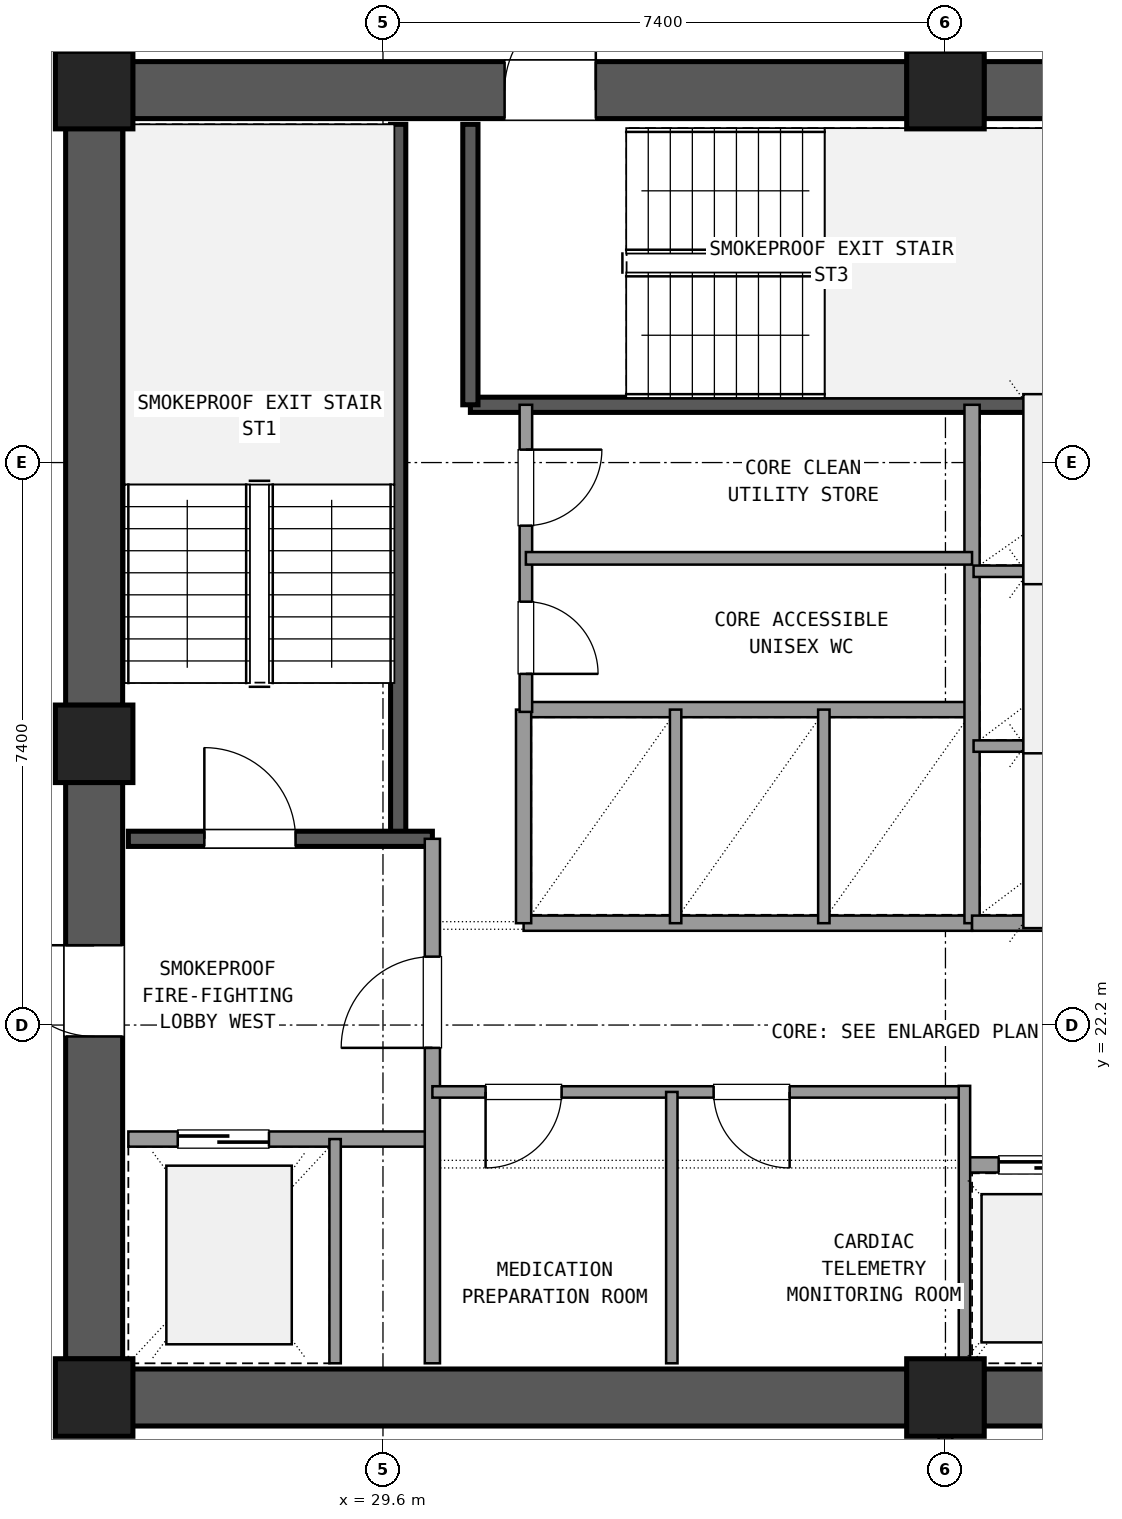
"""IFC4 building model, lengths in metres.
Left out: names, types, materials, properties, quantities, classifications, styles, units other than length and angle.
Written with IfcOpenShell. Run it as: python <this file> out.ifc"""

import sys

from ifc_helpers import new_model, si_unit, direction, frame, frame_2d, origin, origin_2d, place, context, subcontext, project, spatial, rectangle, extrude, element, fill, save


model = new_model("IFC4")
c1 = context("Model", 3, precision=1e-05, world=origin(), true_north=direction((0.0, 1.0)))
c2 = subcontext(c1, "Body", "Model", "MODEL_VIEW")
j1 = project(units=[si_unit("LENGTHUNIT", "METRE"), si_unit("PLANEANGLEUNIT", "RADIAN")], contexts=[c1])
p1 = place(None, origin())
s1 = spatial("IfcSite", under=j1, at=p1, CompositionType="ELEMENT")
p2 = place(p1, origin())
s2 = spatial("IfcBuilding", under=s1, at=p2, CompositionType="ELEMENT")
p3 = place(p2, frame((0.0, 0.0, 163.62)))
s3 = spatial("IfcBuildingStorey", under=s2, at=p3, CompositionType="ELEMENT", Elevation=163.62)
for number, where, z_axis, x_axis in (
    (1, (25.8, 17.3, 0.0), (0.0, 0.0, 1.0), (1.0, 0.0, 0.0)),
    (2, (37.0, 17.3, 0.0), (0.0, 0.0, 1.0), (1.0, 0.0, 0.0)),
    (3, (37.0, 34.5, 0.0), (0.0, 0.0, 1.0), (1.0, 0.0, 0.0)),
    (4, (25.8, 34.5, 0.0), (0.0, 0.0, 1.0), (1.0, 0.0, 0.0)),
    (5, (25.8, 25.9, 0.0), (0.0, 0.0, 1.0), (1.0, 0.0, 0.0)),
):
    element("IfcColumn", number, at=place(p3, frame(where, z_axis=z_axis, x_axis=x_axis)), inside=s3, PredefinedType="COLUMN", context=c2, shape_type="SweptSolid", body=[
        extrude(rectangle(XDim=1.02, YDim=1.02, at=origin_2d()), origin(), (0.0, 0.0, 1.0), 3.6),
    ])
for number, where, z_axis, x_axis in (
    (6, (26.305, 17.3, 0.0), (0.0, 0.0, 1.0), (1.0, 0.0, 0.0)),
    (7, (37.505, 17.3, 0.0), (0.0, 0.0, 1.0), (1.0, 0.0, 0.0)),
):
    element("IfcWall", number, at=place(p3, frame(where, z_axis=z_axis, x_axis=x_axis)), inside=s3, PredefinedType="SHEAR", context=c2, shape_type="SweptSolid", body=[
        extrude(rectangle(XDim=10.19, YDim=0.75, at=frame_2d((5.095, 0.0))), origin(), (0.0, 0.0, 1.0), 3.32),
    ])
p4 = place(p3, frame((47.695, 34.5, 0.0), z_axis=(0.0, 0.0, 1.0), x_axis=(-1.0, 0.0, 0.0)))
e8 = element("IfcWall", 8, at=p4, inside=s3, PredefinedType="SHEAR", context=c2, shape_type="SweptSolid", body=[
    extrude(rectangle(XDim=10.19, YDim=0.75, at=frame_2d((5.095, 0.0))), origin(), (0.0, 0.0, 1.0), 3.32),
])
p5 = place(p4, frame((4.595, 0.0, 0.0)))
e9 = element("IfcOpeningElement", 9, at=p5, cuts=e8, PredefinedType="OPENING", context=c2, shape_type="SweptSolid", body=[
    extrude(rectangle(XDim=1.6, YDim=2.2, at=frame_2d((0.8, 1.1))), frame((0.0, 0.385, 0.0), z_axis=(0.0, -1.0, 0.0), x_axis=(1.0, 0.0, 0.0)), (0.0, 0.0, 1.0), 0.77),
])
p6 = place(p3, frame((36.495, 34.5, 0.0), z_axis=(0.0, 0.0, 1.0), x_axis=(-1.0, 0.0, 0.0)))
e10 = element("IfcWall", 10, at=p6, inside=s3, PredefinedType="SHEAR", context=c2, shape_type="SweptSolid", body=[
    extrude(rectangle(XDim=10.19, YDim=0.75, at=frame_2d((5.095, 0.0))), origin(), (0.0, 0.0, 1.0), 3.32),
])
p7 = place(p6, frame((4.095, 0.0, 0.0)))
e11 = element("IfcOpeningElement", 11, at=p7, cuts=e10, PredefinedType="OPENING", context=c2, shape_type="SweptSolid", body=[
    extrude(rectangle(XDim=1.2, YDim=2.15, at=frame_2d((0.6, 1.075))), frame((0.0, 0.385, 0.0), z_axis=(0.0, -1.0, 0.0), x_axis=(1.0, 0.0, 0.0)), (0.0, 0.0, 1.0), 0.77),
])
p8 = place(p3, frame((25.8, 33.995, 0.0), z_axis=(0.0, 0.0, 1.0), x_axis=(0.0, -1.0, 0.0)))
e12 = element("IfcWall", 12, at=p8, inside=s3, PredefinedType="SHEAR", context=c2, shape_type="SweptSolid", body=[
    extrude(rectangle(XDim=7.59, YDim=0.75, at=frame_2d((3.795, 0.0))), origin(), (0.0, 0.0, 1.0), 3.32),
])
p9 = place(p3, frame((25.8, 25.395, 0.0), z_axis=(0.0, 0.0, 1.0), x_axis=(0.0, -1.0, 0.0)))
e13 = element("IfcWall", 13, at=p9, inside=s3, PredefinedType="SHEAR", context=c2, shape_type="SweptSolid", body=[
    extrude(rectangle(XDim=7.59, YDim=0.75, at=frame_2d((3.795, 0.0))), origin(), (0.0, 0.0, 1.0), 3.32),
])
p10 = place(p9, frame((2.145, 0.0, 0.0)))
e14 = element("IfcOpeningElement", 14, at=p10, cuts=e13, PredefinedType="OPENING", context=c2, shape_type="SweptSolid", body=[
    extrude(rectangle(XDim=1.2, YDim=2.15, at=frame_2d((0.6, 1.075))), frame((0.0, 0.385, 0.0), z_axis=(0.0, -1.0, 0.0), x_axis=(1.0, 0.0, 0.0)), (0.0, 0.0, 1.0), 0.77),
])
p11 = place(p3, frame((29.8, 24.65, 0.0), z_axis=(0.0, 0.0, 1.0), x_axis=(0.0, 1.0, 0.0)))
e15 = element("IfcWall", 15, at=p11, inside=s3, PredefinedType="SHEAR", context=c2, shape_type="SweptSolid", body=[
    extrude(rectangle(XDim=9.4, YDim=0.2, at=frame_2d((4.7, 0.0))), origin(), (0.0, 0.0, 1.0), 3.32),
])
p12 = place(p3, frame((26.25, 24.65, 0.0), z_axis=(0.0, 0.0, 1.0), x_axis=(1.0, 0.0, 0.0)))
e16 = element("IfcWall", 16, at=p12, inside=s3, PredefinedType="SHEAR", context=c2, shape_type="SweptSolid", body=[
    extrude(rectangle(XDim=4.0, YDim=0.2, at=frame_2d((2.0, 0.0))), origin(), (0.0, 0.0, 1.0), 3.32),
])
p13 = place(p12, frame((1.0, 0.0, 0.0)))
e17 = element("IfcOpeningElement", 17, at=p13, cuts=e16, PredefinedType="OPENING", context=c2, shape_type="SweptSolid", body=[
    extrude(rectangle(XDim=1.2, YDim=2.15, at=frame_2d((0.6, 1.075))), frame((0.0, 0.11, 0.0), z_axis=(0.0, -1.0, 0.0), x_axis=(1.0, 0.0, 0.0)), (0.0, 0.0, 1.0), 0.22),
])
p14 = place(p3, frame((30.75, 30.36, 0.0), z_axis=(0.0, 0.0, 1.0), x_axis=(1.0, 0.0, 0.0)))
e18 = element("IfcWall", 18, at=p14, inside=s3, PredefinedType="SHEAR", context=c2, shape_type="SweptSolid", body=[
    extrude(rectangle(XDim=9.5, YDim=0.2, at=frame_2d((4.75, 0.0))), origin(), (0.0, 0.0, 1.0), 3.32),
])
p15 = place(p3, frame((30.75, 30.36, 0.0), z_axis=(0.0, 0.0, 1.0), x_axis=(0.0, 1.0, 0.0)))
e19 = element("IfcWall", 19, at=p15, inside=s3, PredefinedType="SHEAR", context=c2, shape_type="SweptSolid", body=[
    extrude(rectangle(XDim=3.69, YDim=0.2, at=frame_2d((1.845, 0.0))), origin(), (0.0, 0.0, 1.0), 3.32),
])
p16 = place(p3, frame((26.25, 20.7, 0.0), z_axis=(0.0, 0.0, 1.0), x_axis=(1.0, 0.0, 0.0)))
e20 = element("IfcWall", 20, at=p16, inside=s3, PredefinedType="SOLIDWALL", context=c2, shape_type="SweptSolid", body=[
    extrude(rectangle(XDim=4.0, YDim=0.2, at=frame_2d((2.0, 0.0))), origin(), (0.0, 0.0, 1.0), 2.61),
])
p17 = place(p16, frame((0.65, 0.0, 0.0)))
e21 = element("IfcOpeningElement", 21, at=p17, cuts=e20, PredefinedType="OPENING", context=c2, shape_type="SweptSolid", body=[
    extrude(rectangle(XDim=1.2, YDim=2.15, at=frame_2d((0.6, 1.075))), frame((0.0, 0.11, 0.0), z_axis=(0.0, -1.0, 0.0), x_axis=(1.0, 0.0, 0.0)), (0.0, 0.0, 1.0), 0.22),
])
p18 = place(p3, frame((30.25, 17.75, 0.0), z_axis=(0.0, 0.0, 1.0), x_axis=(0.0, 1.0, 0.0)))
e22 = element("IfcWall", 22, at=p18, inside=s3, PredefinedType="SOLIDWALL", context=c2, shape_type="SweptSolid", body=[
    extrude(rectangle(XDim=6.9, YDim=0.2, at=frame_2d((3.45, 0.0))), origin(), (0.0, 0.0, 1.0), 2.61),
])
p19 = place(p18, frame((4.15, 0.0, 0.0)))
e23 = element("IfcOpeningElement", 23, at=p19, cuts=e22, PredefinedType="OPENING", context=c2, shape_type="SweptSolid", body=[
    extrude(rectangle(XDim=1.2, YDim=2.15, at=frame_2d((0.6, 1.075))), frame((0.0, 0.11, 0.0), z_axis=(0.0, -1.0, 0.0), x_axis=(1.0, 0.0, 0.0)), (0.0, 0.0, 1.0), 0.22),
])
p20 = place(p3, frame((28.97, 17.75, 0.0), z_axis=(0.0, 0.0, 1.0), x_axis=(0.0, 1.0, 0.0)))
e24 = element("IfcWall", 24, at=p20, inside=s3, PredefinedType="PARTITIONING", context=c2, shape_type="SweptSolid", body=[
    extrude(rectangle(XDim=2.95, YDim=0.15, at=frame_2d((1.475, 0.0))), origin(), (0.0, 0.0, 1.0), 2.61),
])
p21 = place(p3, frame((30.25, 21.32, 0.0), z_axis=(0.0, 0.0, 1.0), x_axis=(1.0, 0.0, 0.0)))
e25 = element("IfcWall", 25, at=p21, inside=s3, PredefinedType="PARTITIONING", context=c2, shape_type="SweptSolid", body=[
    extrude(rectangle(XDim=7.0, YDim=0.15, at=frame_2d((3.5, 0.0))), origin(), (0.0, 0.0, 1.0), 2.61),
])
p22 = place(p21, frame((0.7, 0.0, 0.0)))
e26 = element("IfcOpeningElement", 26, at=p22, cuts=e25, PredefinedType="OPENING", context=c2, shape_type="SweptSolid", body=[
    extrude(rectangle(XDim=1.0, YDim=2.15, at=frame_2d((0.5, 1.075))), frame((0.0, 0.085, 0.0), z_axis=(0.0, -1.0, 0.0), x_axis=(1.0, 0.0, 0.0)), (0.0, 0.0, 1.0), 0.17),
])
p23 = place(p21, frame((3.7, 0.0, 0.0)))
e27 = element("IfcOpeningElement", 27, at=p23, cuts=e25, PredefinedType="OPENING", context=c2, shape_type="SweptSolid", body=[
    extrude(rectangle(XDim=1.0, YDim=2.15, at=frame_2d((0.5, 1.075))), frame((0.0, 0.085, 0.0), z_axis=(0.0, -1.0, 0.0), x_axis=(1.0, 0.0, 0.0)), (0.0, 0.0, 1.0), 0.17),
])
p24 = place(p3, frame((33.4, 17.75, 0.0), z_axis=(0.0, 0.0, 1.0), x_axis=(0.0, 1.0, 0.0)))
e28 = element("IfcWall", 28, at=p24, inside=s3, PredefinedType="PARTITIONING", context=c2, shape_type="SweptSolid", body=[
    extrude(rectangle(XDim=3.57, YDim=0.15, at=frame_2d((1.785, 0.0))), origin(), (0.0, 0.0, 1.0), 2.61),
])
p25 = place(p3, frame((37.25, 20.36, 0.0), z_axis=(0.0, 0.0, 1.0), x_axis=(1.0, 0.0, 0.0)))
e29 = element("IfcWall", 29, at=p25, inside=s3, PredefinedType="SOLIDWALL", context=c2, shape_type="SweptSolid", body=[
    extrude(rectangle(XDim=6.1, YDim=0.2, at=frame_2d((3.05, 0.0))), origin(), (0.0, 0.0, 1.0), 2.61),
])
p26 = place(p25, frame((0.45, 0.0, 0.0)))
e30 = element("IfcOpeningElement", 30, at=p26, cuts=e29, PredefinedType="OPENING", context=c2, shape_type="SweptSolid", body=[
    extrude(rectangle(XDim=1.1, YDim=2.15, at=frame_2d((0.55, 1.075))), frame((0.0, 0.11, 0.0), z_axis=(0.0, -1.0, 0.0), x_axis=(1.0, 0.0, 0.0)), (0.0, 0.0, 1.0), 0.22),
])
p27 = place(p25, frame((2.5, 0.0, 0.0)))
e31 = element("IfcOpeningElement", 31, at=p27, cuts=e29, PredefinedType="OPENING", context=c2, shape_type="SweptSolid", body=[
    extrude(rectangle(XDim=1.1, YDim=2.15, at=frame_2d((0.55, 1.075))), frame((0.0, 0.11, 0.0), z_axis=(0.0, -1.0, 0.0), x_axis=(1.0, 0.0, 0.0)), (0.0, 0.0, 1.0), 0.22),
])
p28 = place(p25, frame((4.55, 0.0, 0.0)))
e32 = element("IfcOpeningElement", 32, at=p28, cuts=e29, PredefinedType="OPENING", context=c2, shape_type="SweptSolid", body=[
    extrude(rectangle(XDim=1.1, YDim=2.15, at=frame_2d((0.55, 1.075))), frame((0.0, 0.11, 0.0), z_axis=(0.0, -1.0, 0.0), x_axis=(1.0, 0.0, 0.0)), (0.0, 0.0, 1.0), 0.22),
])
p29 = place(p3, frame((37.25, 17.75, 0.0), z_axis=(0.0, 0.0, 1.0), x_axis=(0.0, 1.0, 0.0)))
e33 = element("IfcWall", 33, at=p29, inside=s3, PredefinedType="PARTITIONING", context=c2, shape_type="SweptSolid", body=[
    extrude(rectangle(XDim=3.65, YDim=0.15, at=frame_2d((1.825, 0.0))), origin(), (0.0, 0.0, 1.0), 2.61),
])
for number, where, z_axis, x_axis in (
    (34, (31.45, 23.54, 0.0), (0.0, 0.0, 1.0), (1.0, 0.0, 0.0)),
    (35, (31.45, 26.35, 0.0), (0.0, 0.0, 1.0), (1.0, 0.0, 0.0)),
):
    element("IfcWall", number, at=place(p3, frame(where, z_axis=z_axis, x_axis=x_axis)), inside=s3, PredefinedType="SOLIDWALL", context=c2, shape_type="SweptSolid", body=[
        extrude(rectangle(XDim=5.9, YDim=0.2, at=frame_2d((2.95, 0.0))), origin(), (0.0, 0.0, 1.0), 2.61),
    ])
p30 = place(p3, frame((31.45, 23.54, 0.0), z_axis=(0.0, 0.0, 1.0), x_axis=(0.0, 1.0, 0.0)))
e36 = element("IfcWall", 36, at=p30, inside=s3, PredefinedType="SOLIDWALL", context=c2, shape_type="SweptSolid", body=[
    extrude(rectangle(XDim=2.81, YDim=0.2, at=frame_2d((1.405, 0.0))), origin(), (0.0, 0.0, 1.0), 2.61),
])
for number, where, z_axis, x_axis in (
    (37, (33.45, 23.54, 0.0), (0.0, 0.0, 1.0), (0.0, 1.0, 0.0)),
    (38, (35.4, 23.54, 0.0), (0.0, 0.0, 1.0), (0.0, 1.0, 0.0)),
):
    element("IfcWall", number, at=place(p3, frame(where, z_axis=z_axis, x_axis=x_axis)), inside=s3, PredefinedType="PARTITIONING", context=c2, shape_type="SweptSolid", body=[
        extrude(rectangle(XDim=2.81, YDim=0.15, at=frame_2d((1.405, 0.0))), origin(), (0.0, 0.0, 1.0), 2.61),
    ])
p31 = place(p3, frame((37.35, 23.54, 0.0), z_axis=(0.0, 0.0, 1.0), x_axis=(0.0, 1.0, 0.0)))
e39 = element("IfcWall", 39, at=p31, inside=s3, PredefinedType="SOLIDWALL", context=c2, shape_type="SweptSolid", body=[
    extrude(rectangle(XDim=6.82, YDim=0.2, at=frame_2d((3.41, 0.0))), origin(), (0.0, 0.0, 1.0), 2.61),
])
p32 = place(p3, frame((37.35, 23.54, 0.0), z_axis=(0.0, 0.0, 1.0), x_axis=(1.0, 0.0, 0.0)))
e40 = element("IfcWall", 40, at=p32, inside=s3, PredefinedType="SOLIDWALL", context=c2, shape_type="SweptSolid", body=[
    extrude(rectangle(XDim=3.05, YDim=0.2, at=frame_2d((1.525, 0.0))), origin(), (0.0, 0.0, 1.0), 2.61),
])
for number, where, z_axis, x_axis in (
    (41, (37.37, 25.87, 0.0), (0.0, 0.0, 1.0), (1.0, 0.0, 0.0)),
    (42, (37.37, 28.17, 0.0), (0.0, 0.0, 1.0), (1.0, 0.0, 0.0)),
):
    element("IfcWall", number, at=place(p3, frame(where, z_axis=z_axis, x_axis=x_axis)), inside=s3, PredefinedType="PARTITIONING", context=c2, shape_type="SweptSolid", body=[
        extrude(rectangle(XDim=3.01, YDim=0.15, at=frame_2d((1.505, 0.0))), origin(), (0.0, 0.0, 1.0), 2.61),
    ])
p33 = place(p3, frame((31.48, 26.32, 0.0), z_axis=(0.0, 0.0, 1.0), x_axis=(0.0, 1.0, 0.0)))
e43 = element("IfcWall", 43, at=p33, inside=s3, PredefinedType="PLUMBINGWALL", context=c2, shape_type="SweptSolid", body=[
    extrude(rectangle(XDim=4.04, YDim=0.165, at=frame_2d((2.02, 0.0))), origin(), (0.0, 0.0, 1.0), 2.61),
])
p34 = place(p33, frame((0.5, 0.0, 0.0)))
e44 = element("IfcOpeningElement", 44, at=p34, cuts=e43, PredefinedType="OPENING", context=c2, shape_type="SweptSolid", body=[
    extrude(rectangle(XDim=0.95, YDim=2.1, at=frame_2d((0.475, 1.05))), frame((0.0, 0.093, 0.0), z_axis=(0.0, -1.0, 0.0), x_axis=(1.0, 0.0, 0.0)), (0.0, 0.0, 1.0), 0.185),
])
p35 = place(p33, frame((2.45, 0.0, 0.0)))
e45 = element("IfcOpeningElement", 45, at=p35, cuts=e43, PredefinedType="OPENING", context=c2, shape_type="SweptSolid", body=[
    extrude(rectangle(XDim=1.0, YDim=2.15, at=frame_2d((0.5, 1.075))), frame((0.0, 0.093, 0.0), z_axis=(0.0, -1.0, 0.0), x_axis=(1.0, 0.0, 0.0)), (0.0, 0.0, 1.0), 0.185),
])
p36 = place(p3, frame((31.48, 28.34, 0.0), z_axis=(0.0, 0.0, 1.0), x_axis=(1.0, 0.0, 0.0)))
e46 = element("IfcWall", 46, at=p36, inside=s3, PredefinedType="PLUMBINGWALL", context=c2, shape_type="SweptSolid", body=[
    extrude(rectangle(XDim=5.87, YDim=0.165, at=frame_2d((2.935, 0.0))), origin(), (0.0, 0.0, 1.0), 2.61),
])
p37 = place(p3, frame((37.0, 34.95, 0.0), z_axis=(0.0, 0.0, 1.0), x_axis=(0.0, 1.0, 0.0)))
e47 = element("IfcWall", 47, at=p37, inside=s3, PredefinedType="PARTITIONING", context=c2, shape_type="SweptSolid", body=[
    extrude(rectangle(XDim=3.21, YDim=0.18, at=frame_2d((1.605, 0.0))), origin(), (0.0, 0.0, 1.0), 2.61),
])
p38 = place(p37, frame((0.605, 0.0, 0.0)))
e48 = element("IfcOpeningElement", 48, at=p38, cuts=e47, PredefinedType="OPENING", context=c2, shape_type="SweptSolid", body=[
    extrude(rectangle(XDim=2.0, YDim=2.2, at=frame_2d((1.0, 1.1))), frame((0.0, 0.1, 0.0), z_axis=(0.0, -1.0, 0.0), x_axis=(1.0, 0.0, 0.0)), (0.0, 0.0, 1.0), 0.2),
])
p39 = place(p3, frame((37.0, 13.64, 0.0), z_axis=(0.0, 0.0, 1.0), x_axis=(0.0, 1.0, 0.0)))
e49 = element("IfcWall", 49, at=p39, inside=s3, PredefinedType="PARTITIONING", context=c2, shape_type="SweptSolid", body=[
    extrude(rectangle(XDim=3.21, YDim=0.18, at=frame_2d((1.605, 0.0))), origin(), (0.0, 0.0, 1.0), 2.61),
])
p40 = place(p39, frame((0.605, 0.0, 0.0)))
e50 = element("IfcOpeningElement", 50, at=p40, cuts=e49, PredefinedType="OPENING", context=c2, shape_type="SweptSolid", body=[
    extrude(rectangle(XDim=2.0, YDim=2.2, at=frame_2d((1.0, 1.1))), frame((0.0, 0.1, 0.0), z_axis=(0.0, -1.0, 0.0), x_axis=(1.0, 0.0, 0.0)), (0.0, 0.0, 1.0), 0.2),
])
p41 = place(p13, origin())
e51 = element("IfcDoor", 51, at=p41, inside=s3, OperationType="SINGLE_SWING_LEFT", PredefinedType="DOOR", context=c2, shape_type="SweptSolid", body=[
    extrude(rectangle(XDim=1.2, YDim=2.15, at=frame_2d((0.6, 1.075))), frame((0.0, 0.025, 0.0), z_axis=(0.0, -1.0, 0.0), x_axis=(1.0, 0.0, 0.0)), (0.0, 0.0, 1.0), 0.05),
])
fill(e17, e51)
p42 = place(p17, origin())
e52 = element("IfcDoor", 52, at=p42, inside=s3, OperationType="SLIDING_TO_LEFT", PredefinedType="DOOR", context=c2, shape_type="SweptSolid", body=[
    extrude(rectangle(XDim=1.2, YDim=2.15, at=frame_2d((0.6, 1.075))), frame((0.0, 0.025, 0.0), z_axis=(0.0, -1.0, 0.0), x_axis=(1.0, 0.0, 0.0)), (0.0, 0.0, 1.0), 0.05),
])
fill(e21, e52)
p43 = place(p19, origin())
e53 = element("IfcDoor", 53, at=p43, inside=s3, OperationType="SINGLE_SWING_LEFT", PredefinedType="DOOR", context=c2, shape_type="SweptSolid", body=[
    extrude(rectangle(XDim=1.2, YDim=2.15, at=frame_2d((0.6, 1.075))), frame((0.0, 0.025, 0.0), z_axis=(0.0, -1.0, 0.0), x_axis=(1.0, 0.0, 0.0)), (0.0, 0.0, 1.0), 0.05),
])
fill(e23, e53)
p44 = place(p10, frame((1.2, 0.0, 0.0), z_axis=(0.0, 0.0, 1.0), x_axis=(-1.0, 0.0, 0.0)))
e54 = element("IfcDoor", 54, at=p44, inside=s3, OperationType="SINGLE_SWING_LEFT", PredefinedType="DOOR", context=c2, shape_type="SweptSolid", body=[
    extrude(rectangle(XDim=1.2, YDim=2.15, at=frame_2d((0.6, 1.075))), frame((0.0, 0.025, 0.0), z_axis=(0.0, -1.0, 0.0), x_axis=(1.0, 0.0, 0.0)), (0.0, 0.0, 1.0), 0.05),
])
fill(e14, e54)
p45 = place(p7, frame((1.2, 0.0, 0.0), z_axis=(0.0, 0.0, 1.0), x_axis=(-1.0, 0.0, 0.0)))
e55 = element("IfcDoor", 55, at=p45, inside=s3, OperationType="SINGLE_SWING_LEFT", PredefinedType="DOOR", context=c2, shape_type="SweptSolid", body=[
    extrude(rectangle(XDim=1.2, YDim=2.15, at=frame_2d((0.6, 1.075))), frame((0.0, 0.025, 0.0), z_axis=(0.0, -1.0, 0.0), x_axis=(1.0, 0.0, 0.0)), (0.0, 0.0, 1.0), 0.05),
])
fill(e11, e55)
p46 = place(p22, frame((1.0, 0.0, 0.0), z_axis=(0.0, 0.0, 1.0), x_axis=(-1.0, 0.0, 0.0)))
e56 = element("IfcDoor", 56, at=p46, inside=s3, OperationType="SINGLE_SWING_LEFT", PredefinedType="DOOR", context=c2, shape_type="SweptSolid", body=[
    extrude(rectangle(XDim=1.0, YDim=2.15, at=frame_2d((0.5, 1.075))), frame((0.0, 0.025, 0.0), z_axis=(0.0, -1.0, 0.0), x_axis=(1.0, 0.0, 0.0)), (0.0, 0.0, 1.0), 0.05),
])
fill(e26, e56)
p47 = place(p23, frame((1.0, 0.0, 0.0), z_axis=(0.0, 0.0, 1.0), x_axis=(-1.0, 0.0, 0.0)))
e57 = element("IfcDoor", 57, at=p47, inside=s3, OperationType="SINGLE_SWING_RIGHT", PredefinedType="DOOR", context=c2, shape_type="SweptSolid", body=[
    extrude(rectangle(XDim=1.0, YDim=2.15, at=frame_2d((0.5, 1.075))), frame((0.0, 0.025, 0.0), z_axis=(0.0, -1.0, 0.0), x_axis=(1.0, 0.0, 0.0)), (0.0, 0.0, 1.0), 0.05),
])
fill(e27, e57)
p48 = place(p26, origin())
e58 = element("IfcDoor", 58, at=p48, inside=s3, OperationType="SLIDING_TO_LEFT", PredefinedType="DOOR", context=c2, shape_type="SweptSolid", body=[
    extrude(rectangle(XDim=1.1, YDim=2.15, at=frame_2d((0.55, 1.075))), frame((0.0, 0.025, 0.0), z_axis=(0.0, -1.0, 0.0), x_axis=(1.0, 0.0, 0.0)), (0.0, 0.0, 1.0), 0.05),
])
fill(e30, e58)
p49 = place(p34, frame((0.95, 0.0, 0.0), z_axis=(0.0, 0.0, 1.0), x_axis=(-1.0, 0.0, 0.0)))
e59 = element("IfcDoor", 59, at=p49, inside=s3, OperationType="SINGLE_SWING_LEFT", PredefinedType="DOOR", context=c2, shape_type="SweptSolid", body=[
    extrude(rectangle(XDim=0.95, YDim=2.1, at=frame_2d((0.475, 1.05))), frame((0.0, 0.025, 0.0), z_axis=(0.0, -1.0, 0.0), x_axis=(1.0, 0.0, 0.0)), (0.0, 0.0, 1.0), 0.05),
])
fill(e44, e59)
p50 = place(p35, frame((1.0, 0.0, 0.0), z_axis=(0.0, 0.0, 1.0), x_axis=(-1.0, 0.0, 0.0)))
e60 = element("IfcDoor", 60, at=p50, inside=s3, OperationType="SINGLE_SWING_RIGHT", PredefinedType="DOOR", context=c2, shape_type="SweptSolid", body=[
    extrude(rectangle(XDim=1.0, YDim=2.15, at=frame_2d((0.5, 1.075))), frame((0.0, 0.025, 0.0), z_axis=(0.0, -1.0, 0.0), x_axis=(1.0, 0.0, 0.0)), (0.0, 0.0, 1.0), 0.05),
])
fill(e45, e60)
save(model, sys.argv[1])
